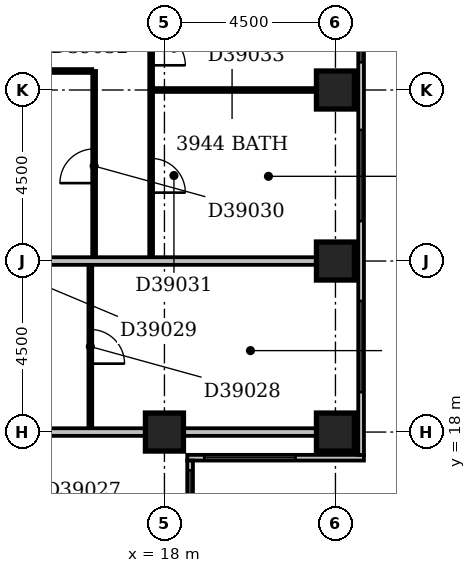
"""IFC4 building model, lengths in metres.
Left out: names, types, materials, properties, quantities, classifications, styles, units other than length and angle.
Written with IfcOpenShell. Run it as: python <this file> out.ifc"""

import sys

from ifc_helpers import new_model, si_unit, direction, frame, frame_2d, origin, origin_2d, place, context, subcontext, project, spatial, rectangle, extrude, element, fill, save


model = new_model("IFC4")
c1 = context("Model", 3, precision=1e-05, world=origin(), true_north=direction((0.0, 1.0)))
c2 = subcontext(c1, "Body", "Model", "MODEL_VIEW")
j1 = project(units=[si_unit("LENGTHUNIT", "METRE"), si_unit("PLANEANGLEUNIT", "RADIAN")], contexts=[c1])
p1 = place(None, origin())
s1 = spatial("IfcSite", under=j1, at=p1, CompositionType="ELEMENT")
p2 = place(p1, origin())
s2 = spatial("IfcBuilding", under=s1, at=p2, CompositionType="ELEMENT")
p3 = place(p2, frame((0.0, 0.0, 155.6)))
s3 = spatial("IfcBuildingStorey", under=s2, at=p3, CompositionType="ELEMENT", Elevation=155.6)
for number, where, z_axis, x_axis in (
    (1, (18.0, 18.0, -0.3), (0.0, 0.0, 1.0), (1.0, 0.0, 0.0)),
    (2, (22.5, 18.0, -0.3), (0.0, 0.0, 1.0), (1.0, 0.0, 0.0)),
    (3, (22.5, 22.5, -0.3), (0.0, 0.0, 1.0), (1.0, 0.0, 0.0)),
    (4, (22.5, 27.0, -0.3), (0.0, 0.0, 1.0), (1.0, 0.0, 0.0)),
):
    element("IfcColumn", number, at=place(p3, frame(where, z_axis=z_axis, x_axis=x_axis)), inside=s3, PredefinedType="COLUMN", context=c2, shape_type="SweptSolid", body=[
        extrude(rectangle(XDim=1.0, YDim=1.0, at=origin_2d()), origin(), (0.0, 0.0, 1.0), 3.6),
    ])
p4 = place(p3, frame((18.675, 8.4, 0.0), z_axis=(0.0, 0.0, 1.0), x_axis=(0.0, 1.0, 0.0)))
e5 = element("IfcWall", 5, at=p4, inside=s3, PredefinedType="STANDARD", context=c2, shape_type="SweptSolid", body=[
    extrude(rectangle(XDim=8.85, YDim=0.15, at=frame_2d((4.425, 0.0))), origin(), (0.0, 0.0, 1.0), 2.7),
])
p5 = place(p4, frame((1.65, 0.0, 0.6)))
e6 = element("IfcOpeningElement", 6, at=p5, cuts=e5, PredefinedType="OPENING", context=c2, shape_type="SweptSolid", body=[
    extrude(rectangle(XDim=2.4, YDim=1.8, at=frame_2d((1.2, 0.9))), frame((0.0, 0.087, 0.0), z_axis=(0.0, -1.0, 0.0), x_axis=(1.0, 0.0, 0.0)), (0.0, 0.0, 1.0), 0.174),
])
p6 = place(p4, frame((7.395, 0.0, 0.6)))
e7 = element("IfcOpeningElement", 7, at=p6, cuts=e5, PredefinedType="OPENING", context=c2, shape_type="SweptSolid", body=[
    extrude(rectangle(XDim=1.2, YDim=1.8, at=frame_2d((0.6, 0.9))), frame((0.0, 0.087, 0.0), z_axis=(0.0, -1.0, 0.0), x_axis=(1.0, 0.0, 0.0)), (0.0, 0.0, 1.0), 0.174),
])
p7 = place(p3, frame((18.6, 17.325, 0.0), z_axis=(0.0, 0.0, 1.0), x_axis=(1.0, 0.0, 0.0)))
e8 = element("IfcWall", 8, at=p7, inside=s3, PredefinedType="STANDARD", context=c2, shape_type="SweptSolid", body=[
    extrude(rectangle(XDim=4.65, YDim=0.15, at=frame_2d((2.325, 0.0))), origin(), (0.0, 0.0, 1.0), 2.7),
])
p8 = place(p7, frame((0.45, 0.0, 0.6)))
e9 = element("IfcOpeningElement", 9, at=p8, cuts=e8, PredefinedType="OPENING", context=c2, shape_type="SweptSolid", body=[
    extrude(rectangle(XDim=2.4, YDim=1.8, at=frame_2d((1.2, 0.9))), frame((0.0, 0.087, 0.0), z_axis=(0.0, -1.0, 0.0), x_axis=(1.0, 0.0, 0.0)), (0.0, 0.0, 1.0), 0.174),
])
p9 = place(p3, frame((23.175, 17.4, 0.0), z_axis=(0.0, 0.0, 1.0), x_axis=(0.0, 1.0, 0.0)))
e10 = element("IfcWall", 10, at=p9, inside=s3, PredefinedType="STANDARD", context=c2, shape_type="SweptSolid", body=[
    extrude(rectangle(XDim=17.85, YDim=0.15, at=frame_2d((8.925, 0.0))), origin(), (0.0, 0.0, 1.0), 2.7),
])
p10 = place(p9, frame((1.65, 0.0, 0.6)))
e11 = element("IfcOpeningElement", 11, at=p10, cuts=e10, PredefinedType="OPENING", context=c2, shape_type="SweptSolid", body=[
    extrude(rectangle(XDim=2.4, YDim=1.8, at=frame_2d((1.2, 0.9))), frame((0.0, 0.087, 0.0), z_axis=(0.0, -1.0, 0.0), x_axis=(1.0, 0.0, 0.0)), (0.0, 0.0, 1.0), 0.174),
])
p11 = place(p9, frame((6.15, 0.0, 0.6)))
e12 = element("IfcOpeningElement", 12, at=p11, cuts=e10, PredefinedType="OPENING", context=c2, shape_type="SweptSolid", body=[
    extrude(rectangle(XDim=2.4, YDim=1.8, at=frame_2d((1.2, 0.9))), frame((0.0, 0.087, 0.0), z_axis=(0.0, -1.0, 0.0), x_axis=(1.0, 0.0, 0.0)), (0.0, 0.0, 1.0), 0.174),
])
p12 = place(p9, frame((10.329, 0.0, 0.6)))
e13 = element("IfcOpeningElement", 13, at=p12, cuts=e10, PredefinedType="OPENING", context=c2, shape_type="SweptSolid", body=[
    extrude(rectangle(XDim=2.1, YDim=1.8, at=frame_2d((1.05, 0.9))), frame((0.0, 0.087, 0.0), z_axis=(0.0, -1.0, 0.0), x_axis=(1.0, 0.0, 0.0)), (0.0, 0.0, 1.0), 0.174),
])
p13 = place(p9, frame((15.15, 0.0, 0.6)))
e14 = element("IfcOpeningElement", 14, at=p13, cuts=e10, PredefinedType="OPENING", context=c2, shape_type="SweptSolid", body=[
    extrude(rectangle(XDim=2.4, YDim=1.8, at=frame_2d((1.2, 0.9))), frame((0.0, 0.087, 0.0), z_axis=(0.0, -1.0, 0.0), x_axis=(1.0, 0.0, 0.0)), (0.0, 0.0, 1.0), 0.174),
])
p14 = place(p3, frame((9.1, 18.0, 0.0), z_axis=(0.0, 0.0, 1.0), x_axis=(1.0, 0.0, 0.0)))
e15 = element("IfcWall", 15, at=p14, inside=s3, PredefinedType="PARTITIONING", context=c2, shape_type="SweptSolid", body=[
    extrude(rectangle(XDim=8.4, YDim=0.2, at=frame_2d((4.2, 0.0))), origin(), (0.0, 0.0, 1.0), 2.6),
])
p15 = place(p3, frame((18.5, 18.0, 0.0), z_axis=(0.0, 0.0, 1.0), x_axis=(1.0, 0.0, 0.0)))
e16 = element("IfcWall", 16, at=p15, inside=s3, PredefinedType="PARTITIONING", context=c2, shape_type="SweptSolid", body=[
    extrude(rectangle(XDim=3.5, YDim=0.2, at=frame_2d((1.75, 0.0))), origin(), (0.0, 0.0, 1.0), 2.7),
])
p16 = place(p3, frame((16.05, 18.1, 0.0), z_axis=(0.0, 0.0, 1.0), x_axis=(0.0, 1.0, 0.0)))
e17 = element("IfcWall", 17, at=p16, inside=s3, PredefinedType="PARTITIONING", context=c2, shape_type="SweptSolid", body=[
    extrude(rectangle(XDim=4.3, YDim=0.1, at=frame_2d((2.15, 0.0))), origin(), (0.0, 0.0, 1.0), 3.3),
])
p17 = place(p16, frame((1.7, 0.0, 0.0)))
e18 = element("IfcOpeningElement", 18, at=p17, cuts=e17, PredefinedType="OPENING", context=c2, shape_type="SweptSolid", body=[
    extrude(rectangle(XDim=0.9, YDim=2.1, at=frame_2d((0.45, 1.05))), frame((0.0, 0.062, 0.0), z_axis=(0.0, -1.0, 0.0), x_axis=(1.0, 0.0, 0.0)), (0.0, 0.0, 1.0), 0.124),
])
p18 = place(p3, frame((9.1, 22.5, 0.0), z_axis=(0.0, 0.0, 1.0), x_axis=(1.0, 0.0, 0.0)))
e19 = element("IfcWall", 19, at=p18, inside=s3, PredefinedType="PARTITIONING", context=c2, shape_type="SweptSolid", body=[
    extrude(rectangle(XDim=12.9, YDim=0.2, at=frame_2d((6.45, 0.0))), origin(), (0.0, 0.0, 1.0), 3.3),
])
p19 = place(p3, frame((16.15, 22.6, 0.0), z_axis=(0.0, 0.0, 1.0), x_axis=(0.0, 1.0, 0.0)))
e20 = element("IfcWall", 20, at=p19, inside=s3, PredefinedType="PARTITIONING", context=c2, shape_type="SweptSolid", body=[
    extrude(rectangle(XDim=4.9, YDim=0.1, at=frame_2d((2.45, 0.0))), origin(), (0.0, 0.0, 1.0), 3.3),
])
p20 = place(p19, frame((1.95, 0.0, 0.0)))
e21 = element("IfcOpeningElement", 21, at=p20, cuts=e20, PredefinedType="OPENING", context=c2, shape_type="SweptSolid", body=[
    extrude(rectangle(XDim=0.9, YDim=2.1, at=frame_2d((0.45, 1.05))), frame((0.0, 0.062, 0.0), z_axis=(0.0, -1.0, 0.0), x_axis=(1.0, 0.0, 0.0)), (0.0, 0.0, 1.0), 0.124),
])
p21 = place(p3, frame((17.65, 22.6, 0.0), z_axis=(0.0, 0.0, 1.0), x_axis=(0.0, 1.0, 0.0)))
e22 = element("IfcWall", 22, at=p21, inside=s3, PredefinedType="PARTITIONING", context=c2, shape_type="SweptSolid", body=[
    extrude(rectangle(XDim=8.8, YDim=0.1, at=frame_2d((4.4, 0.0))), origin(), (0.0, 0.0, 1.0), 3.3),
])
p22 = place(p21, frame((1.7, 0.0, 0.0)))
e23 = element("IfcOpeningElement", 23, at=p22, cuts=e22, PredefinedType="OPENING", context=c2, shape_type="SweptSolid", body=[
    extrude(rectangle(XDim=0.9, YDim=2.1, at=frame_2d((0.45, 1.05))), frame((0.0, 0.062, 0.0), z_axis=(0.0, -1.0, 0.0), x_axis=(1.0, 0.0, 0.0)), (0.0, 0.0, 1.0), 0.124),
])
p23 = place(p21, frame((5.05, 0.0, 0.0)))
e24 = element("IfcOpeningElement", 24, at=p23, cuts=e22, PredefinedType="OPENING", context=c2, shape_type="SweptSolid", body=[
    extrude(rectangle(XDim=0.9, YDim=2.1, at=frame_2d((0.45, 1.05))), frame((0.0, 0.062, 0.0), z_axis=(0.0, -1.0, 0.0), x_axis=(1.0, 0.0, 0.0)), (0.0, 0.0, 1.0), 0.124),
])
p24 = place(p3, frame((17.7, 27.0, 0.0), z_axis=(0.0, 0.0, 1.0), x_axis=(1.0, 0.0, 0.0)))
e25 = element("IfcWall", 25, at=p24, inside=s3, PredefinedType="PARTITIONING", context=c2, shape_type="SweptSolid", body=[
    extrude(rectangle(XDim=4.3, YDim=0.1, at=frame_2d((2.15, 0.0))), origin(), (0.0, 0.0, 1.0), 2.7),
])
p25 = place(p3, frame((9.1, 27.5, 0.0), z_axis=(0.0, 0.0, 1.0), x_axis=(1.0, 0.0, 0.0)))
e26 = element("IfcWall", 26, at=p25, inside=s3, PredefinedType="PARTITIONING", context=c2, shape_type="SweptSolid", body=[
    extrude(rectangle(XDim=7.0, YDim=0.1, at=frame_2d((3.5, 0.0))), origin(), (0.0, 0.0, 1.0), 2.7),
])
p26 = place(p6, origin())
e27 = element("IfcWindow", 27, at=p26, inside=s3, PartitioningType="SINGLE_PANEL", PredefinedType="WINDOW", context=c2, shape_type="SweptSolid", body=[
    extrude(rectangle(XDim=1.2, YDim=1.8, at=frame_2d((0.6, 0.9))), frame((0.0, 0.03, 0.0), z_axis=(0.0, -1.0, 0.0), x_axis=(1.0, 0.0, 0.0)), (0.0, 0.0, 1.0), 0.06),
])
fill(e7, e27)
p27 = place(p8, origin())
e28 = element("IfcWindow", 28, at=p27, inside=s3, PartitioningType="SINGLE_PANEL", PredefinedType="WINDOW", context=c2, shape_type="SweptSolid", body=[
    extrude(rectangle(XDim=2.4, YDim=1.8, at=frame_2d((1.2, 0.9))), frame((0.0, 0.03, 0.0), z_axis=(0.0, -1.0, 0.0), x_axis=(1.0, 0.0, 0.0)), (0.0, 0.0, 1.0), 0.06),
])
fill(e9, e28)
p28 = place(p10, origin())
e29 = element("IfcWindow", 29, at=p28, inside=s3, PartitioningType="SINGLE_PANEL", PredefinedType="WINDOW", context=c2, shape_type="SweptSolid", body=[
    extrude(rectangle(XDim=2.4, YDim=1.8, at=frame_2d((1.2, 0.9))), frame((0.0, 0.03, 0.0), z_axis=(0.0, -1.0, 0.0), x_axis=(1.0, 0.0, 0.0)), (0.0, 0.0, 1.0), 0.06),
])
fill(e11, e29)
p29 = place(p11, origin())
e30 = element("IfcWindow", 30, at=p29, inside=s3, PartitioningType="SINGLE_PANEL", PredefinedType="WINDOW", context=c2, shape_type="SweptSolid", body=[
    extrude(rectangle(XDim=2.4, YDim=1.8, at=frame_2d((1.2, 0.9))), frame((0.0, 0.03, 0.0), z_axis=(0.0, -1.0, 0.0), x_axis=(1.0, 0.0, 0.0)), (0.0, 0.0, 1.0), 0.06),
])
fill(e12, e30)
p30 = place(p12, origin())
e31 = element("IfcWindow", 31, at=p30, inside=s3, PartitioningType="SINGLE_PANEL", PredefinedType="WINDOW", context=c2, shape_type="SweptSolid", body=[
    extrude(rectangle(XDim=2.1, YDim=1.8, at=frame_2d((1.05, 0.9))), frame((0.0, 0.03, 0.0), z_axis=(0.0, -1.0, 0.0), x_axis=(1.0, 0.0, 0.0)), (0.0, 0.0, 1.0), 0.06),
])
fill(e13, e31)
p31 = place(p17, frame((0.9, 0.0, 0.0), z_axis=(0.0, 0.0, 1.0), x_axis=(-1.0, 0.0, 0.0)))
e32 = element("IfcDoor", 32, at=p31, inside=s3, OperationType="SINGLE_SWING_RIGHT", PredefinedType="DOOR", context=c2, shape_type="SweptSolid", body=[
    extrude(rectangle(XDim=0.9, YDim=2.1, at=frame_2d((0.45, 1.05))), frame((0.0, 0.025, 0.0), z_axis=(0.0, -1.0, 0.0), x_axis=(1.0, 0.0, 0.0)), (0.0, 0.0, 1.0), 0.05),
])
fill(e18, e32)
p32 = place(p20, origin())
e33 = element("IfcDoor", 33, at=p32, inside=s3, OperationType="SINGLE_SWING_LEFT", PredefinedType="DOOR", context=c2, shape_type="SweptSolid", body=[
    extrude(rectangle(XDim=0.9, YDim=2.1, at=frame_2d((0.45, 1.05))), frame((0.0, 0.025, 0.0), z_axis=(0.0, -1.0, 0.0), x_axis=(1.0, 0.0, 0.0)), (0.0, 0.0, 1.0), 0.05),
])
fill(e21, e33)
p33 = place(p22, frame((0.9, 0.0, 0.0), z_axis=(0.0, 0.0, 1.0), x_axis=(-1.0, 0.0, 0.0)))
e34 = element("IfcDoor", 34, at=p33, inside=s3, OperationType="SINGLE_SWING_RIGHT", PredefinedType="DOOR", context=c2, shape_type="SweptSolid", body=[
    extrude(rectangle(XDim=0.9, YDim=2.1, at=frame_2d((0.45, 1.05))), frame((0.0, 0.025, 0.0), z_axis=(0.0, -1.0, 0.0), x_axis=(1.0, 0.0, 0.0)), (0.0, 0.0, 1.0), 0.05),
])
fill(e23, e34)
p34 = place(p23, frame((0.9, 0.0, 0.0), z_axis=(0.0, 0.0, 1.0), x_axis=(-1.0, 0.0, 0.0)))
e35 = element("IfcDoor", 35, at=p34, inside=s3, OperationType="SINGLE_SWING_RIGHT", PredefinedType="DOOR", context=c2, shape_type="SweptSolid", body=[
    extrude(rectangle(XDim=0.9, YDim=2.1, at=frame_2d((0.45, 1.05))), frame((0.0, 0.025, 0.0), z_axis=(0.0, -1.0, 0.0), x_axis=(1.0, 0.0, 0.0)), (0.0, 0.0, 1.0), 0.05),
])
fill(e24, e35)
save(model, sys.argv[1])
